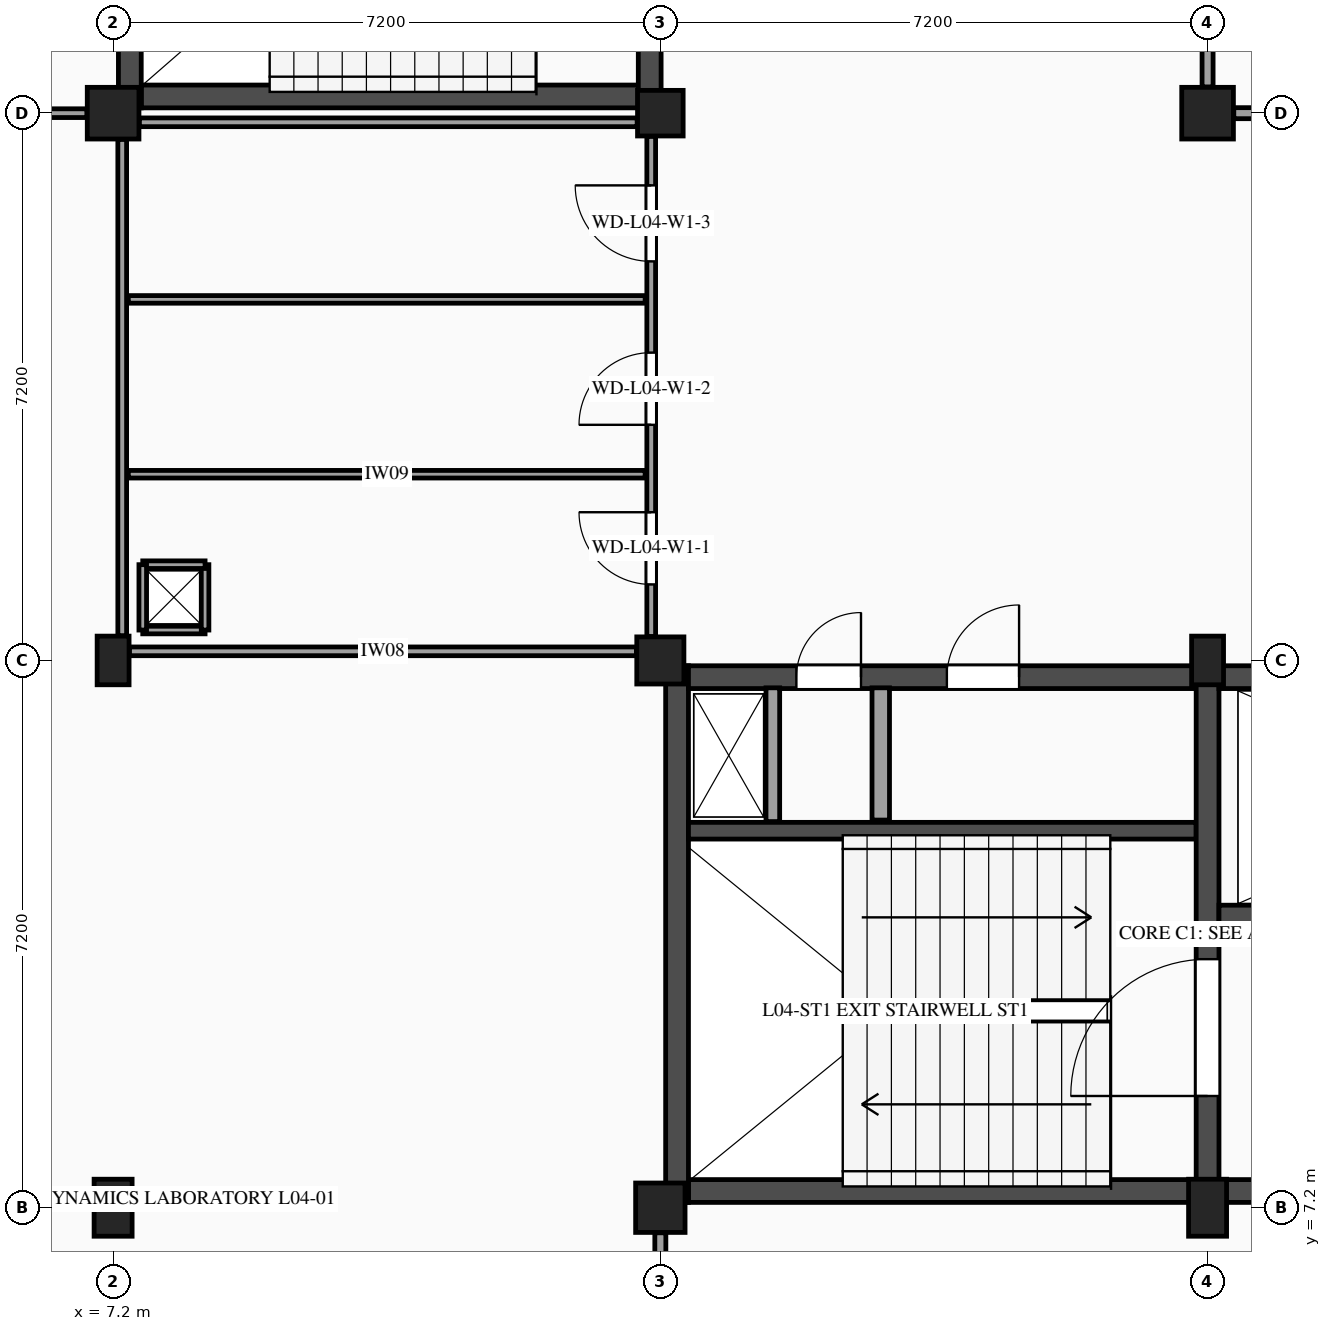
"""IFC4 building model, lengths in metres.
Left out: names, types, materials, properties, quantities, classifications, styles, units other than length and angle.
Written with IfcOpenShell. Run it as: python <this file> out.ifc"""

import sys

from ifc_helpers import new_model, si_unit, direction, frame, frame_2d, origin, origin_2d, place, context, subcontext, project, spatial, rectangle, extrude, element, fill, save


model = new_model("IFC4")
c1 = context("Model", 3, precision=1e-05, world=origin(), true_north=direction((0.0, 1.0)))
c2 = subcontext(c1, "Body", "Model", "MODEL_VIEW")
j1 = project(units=[si_unit("LENGTHUNIT", "METRE"), si_unit("PLANEANGLEUNIT", "RADIAN")], contexts=[c1])
p1 = place(None, origin())
s1 = spatial("IfcSite", under=j1, at=p1, CompositionType="ELEMENT")
p2 = place(p1, origin())
s2 = spatial("IfcBuilding", under=s1, at=p2, CompositionType="ELEMENT")
p3 = place(p2, frame((0.0, 0.0, 18.6)))
s3 = spatial("IfcBuildingStorey", under=s2, at=p3, CompositionType="ELEMENT", Elevation=18.6)
p4 = place(p3, frame((7.2, 7.2, 0.0), z_axis=(0.0, 0.0, 1.0), x_axis=(1.0, 0.0, 0.0)))
e1 = element("IfcColumn", 1, at=p4, inside=s3, PredefinedType="COLUMN", context=c2, shape_type="SweptSolid", body=[
    extrude(rectangle(XDim=0.5, YDim=0.75, at=origin_2d()), origin(), (0.0, 0.0, 1.0), 4.2),
])
p5 = place(p3, frame((7.2, 14.4, 0.0), z_axis=(0.0, 0.0, 1.0), x_axis=(1.0, 0.0, 0.0)))
e2 = element("IfcColumn", 2, at=p5, inside=s3, PredefinedType="PILASTER", context=c2, shape_type="SweptSolid", body=[
    extrude(rectangle(XDim=0.42, YDim=0.64, at=origin_2d()), origin(), (0.0, 0.0, 1.0), 4.2),
])
p6 = place(p3, frame((7.2, 21.6, 0.0), z_axis=(0.0, 0.0, 1.0), x_axis=(1.0, 0.0, 0.0)))
e3 = element("IfcColumn", 3, at=p6, inside=s3, PredefinedType="COLUMN", context=c2, shape_type="SweptSolid", body=[
    extrude(rectangle(XDim=0.68, YDim=0.68, at=origin_2d()), origin(), (0.0, 0.0, 1.0), 4.2),
])
p7 = place(p3, frame((14.4, 7.2, 0.0), z_axis=(0.0, 0.0, 1.0), x_axis=(1.0, 0.0, 0.0)))
e4 = element("IfcColumn", 4, at=p7, inside=s3, PredefinedType="COLUMN", context=c2, shape_type="SweptSolid", body=[
    extrude(rectangle(XDim=0.65, YDim=0.65, at=origin_2d()), origin(), (0.0, 0.0, 1.0), 4.2),
])
p8 = place(p3, frame((14.4, 14.4, 0.0), z_axis=(0.0, 0.0, 1.0), x_axis=(1.0, 0.0, 0.0)))
e5 = element("IfcColumn", 5, at=p8, inside=s3, PredefinedType="COLUMN", context=c2, shape_type="SweptSolid", body=[
    extrude(rectangle(XDim=0.62, YDim=0.62, at=origin_2d()), origin(), (0.0, 0.0, 1.0), 4.2),
])
p9 = place(p3, frame((14.4, 21.6, 0.0), z_axis=(0.0, 0.0, 1.0), x_axis=(1.0, 0.0, 0.0)))
e6 = element("IfcColumn", 6, at=p9, inside=s3, PredefinedType="COLUMN", context=c2, shape_type="SweptSolid", body=[
    extrude(rectangle(XDim=0.6, YDim=0.6, at=origin_2d()), origin(), (0.0, 0.0, 1.0), 4.2),
])
p10 = place(p3, frame((21.6, 7.2, 0.0), z_axis=(0.0, 0.0, 1.0), x_axis=(1.0, 0.0, 0.0)))
e7 = element("IfcColumn", 7, at=p10, inside=s3, PredefinedType="COLUMN", context=c2, shape_type="SweptSolid", body=[
    extrude(rectangle(XDim=0.5, YDim=0.75, at=origin_2d()), origin(), (0.0, 0.0, 1.0), 4.2),
])
p11 = place(p3, frame((21.6, 14.4, 0.0), z_axis=(0.0, 0.0, 1.0), x_axis=(1.0, 0.0, 0.0)))
e8 = element("IfcColumn", 8, at=p11, inside=s3, PredefinedType="PILASTER", context=c2, shape_type="SweptSolid", body=[
    extrude(rectangle(XDim=0.42, YDim=0.64, at=origin_2d()), origin(), (0.0, 0.0, 1.0), 4.2),
])
p12 = place(p3, frame((21.6, 21.6, 0.0), z_axis=(0.0, 0.0, 1.0), x_axis=(1.0, 0.0, 0.0)))
e9 = element("IfcColumn", 9, at=p12, inside=s3, PredefinedType="COLUMN", context=c2, shape_type="SweptSolid", body=[
    extrude(rectangle(XDim=0.68, YDim=0.68, at=origin_2d()), origin(), (0.0, 0.0, 1.0), 4.2),
])
p13 = place(p3, frame((14.77, 7.42, 0.0), z_axis=(0.0, 0.0, 1.0), x_axis=(1.0, 0.0, 0.0)))
e10 = element("IfcWall", 10, at=p13, inside=s3, PredefinedType="SHEAR", context=c2, shape_type="SweptSolid", body=[
    extrude(rectangle(XDim=6.68, YDim=0.3, at=frame_2d((3.34, 0.0))), origin(), (0.0, 0.0, 1.0), 3.955),
])
p14 = place(p3, frame((14.62, 14.33, 0.0), z_axis=(0.0, 0.0, 1.0), x_axis=(0.0, -1.0, 0.0)))
e11 = element("IfcWall", 11, at=p14, inside=s3, PredefinedType="SHEAR", context=c2, shape_type="SweptSolid", body=[
    extrude(rectangle(XDim=7.06, YDim=0.3, at=frame_2d((3.53, 0.0))), origin(), (0.0, 0.0, 1.0), 3.955),
])
p15 = place(p3, frame((14.77, 14.18, 0.0), z_axis=(0.0, 0.0, 1.0), x_axis=(1.0, 0.0, 0.0)))
e12 = element("IfcWall", 12, at=p15, inside=s3, PredefinedType="SHEAR", context=c2, shape_type="SweptSolid", body=[
    extrude(rectangle(XDim=6.68, YDim=0.3, at=frame_2d((3.34, 0.0))), origin(), (0.0, 0.0, 1.0), 3.955),
])
p16 = place(p15, frame((1.42, 0.0, 0.0)))
e13 = element("IfcOpeningElement", 13, at=p16, cuts=e12, PredefinedType="OPENING", context=c2, shape_type="SweptSolid", body=[
    extrude(rectangle(XDim=0.85, YDim=2.1, at=frame_2d((0.425, 1.05))), frame((0.0, 0.16, 0.0), z_axis=(0.0, -1.0, 0.0), x_axis=(1.0, 0.0, 0.0)), (0.0, 0.0, 1.0), 0.32),
])
p17 = place(p15, frame((3.4, 0.0, 0.0)))
e14 = element("IfcOpeningElement", 14, at=p17, cuts=e12, PredefinedType="OPENING", context=c2, shape_type="SweptSolid", body=[
    extrude(rectangle(XDim=0.95, YDim=2.15, at=frame_2d((0.475, 1.075))), frame((0.0, 0.16, 0.0), z_axis=(0.0, -1.0, 0.0), x_axis=(1.0, 0.0, 0.0)), (0.0, 0.0, 1.0), 0.32),
])
p18 = place(p3, frame((14.77, 12.16, 0.0), z_axis=(0.0, 0.0, 1.0), x_axis=(1.0, 0.0, 0.0)))
e15 = element("IfcWall", 15, at=p18, inside=s3, PredefinedType="SHEAR", context=c2, shape_type="SweptSolid", body=[
    extrude(rectangle(XDim=6.68, YDim=0.22, at=frame_2d((3.34, 0.0))), origin(), (0.0, 0.0, 1.0), 3.955),
])
p19 = place(p3, frame((17.3, 12.3, 0.0), z_axis=(0.0, 0.0, 1.0), x_axis=(0.0, 1.0, 0.0)))
e16 = element("IfcWall", 16, at=p19, inside=s3, PredefinedType="PARTITIONING", context=c2, shape_type="SweptSolid", body=[
    extrude(rectangle(XDim=1.74, YDim=0.23, at=frame_2d((0.87, 0.0))), origin(), (0.0, 0.0, 1.0), 3.955),
])
p20 = place(p3, frame((15.88, 12.28, 0.0), z_axis=(0.0, 0.0, 1.0), x_axis=(0.0, 1.0, 0.0)))
e17 = element("IfcWall", 17, at=p20, inside=s3, PredefinedType="PARTITIONING", context=c2, shape_type="SweptSolid", body=[
    extrude(rectangle(XDim=1.76, YDim=0.18, at=frame_2d((0.88, 0.0))), origin(), (0.0, 0.0, 1.0), 3.955),
])
p21 = place(p3, frame((21.6, 7.27, 0.0), z_axis=(0.0, 0.0, 1.0), x_axis=(0.0, 1.0, 0.0)))
e18 = element("IfcWall", 18, at=p21, inside=s3, PredefinedType="SHEAR", context=c2, shape_type="SweptSolid", body=[
    extrude(rectangle(XDim=7.06, YDim=0.3, at=frame_2d((3.53, 0.0))), origin(), (0.0, 0.0, 1.0), 3.955),
])
p22 = place(p21, frame((1.4, 0.0, 0.0)))
e19 = element("IfcOpeningElement", 19, at=p22, cuts=e18, PredefinedType="OPENING", context=c2, shape_type="SweptSolid", body=[
    extrude(rectangle(XDim=1.8, YDim=2.2, at=frame_2d((0.9, 1.1))), frame((0.0, 0.16, 0.0), z_axis=(0.0, -1.0, 0.0), x_axis=(1.0, 0.0, 0.0)), (0.0, 0.0, 1.0), 0.32),
])
p23 = place(p3, frame((21.75, 7.42, 0.0), z_axis=(0.0, 0.0, 1.0), x_axis=(1.0, 0.0, 0.0)))
e20 = element("IfcWall", 20, at=p23, inside=s3, PredefinedType="SHEAR", context=c2, shape_type="SweptSolid", body=[
    extrude(rectangle(XDim=6.68, YDim=0.3, at=frame_2d((3.34, 0.0))), origin(), (0.0, 0.0, 1.0), 3.955),
])
p24 = place(p23, frame((2.22, 0.0, 0.0)))
e21 = element("IfcOpeningElement", 21, at=p24, cuts=e20, PredefinedType="OPENING", context=c2, shape_type="SweptSolid", body=[
    extrude(rectangle(XDim=1.8, YDim=2.2, at=frame_2d((0.9, 1.1))), frame((0.0, 0.16, 0.0), z_axis=(0.0, -1.0, 0.0), x_axis=(1.0, 0.0, 0.0)), (0.0, 0.0, 1.0), 0.32),
])
p25 = place(p3, frame((21.75, 14.18, 0.0), z_axis=(0.0, 0.0, 1.0), x_axis=(1.0, 0.0, 0.0)))
e22 = element("IfcWall", 22, at=p25, inside=s3, PredefinedType="SHEAR", context=c2, shape_type="SweptSolid", body=[
    extrude(rectangle(XDim=6.68, YDim=0.3, at=frame_2d((3.34, 0.0))), origin(), (0.0, 0.0, 1.0), 3.955),
])
p26 = place(p3, frame((21.75, 11.05, 0.0), z_axis=(0.0, 0.0, 1.0), x_axis=(1.0, 0.0, 0.0)))
e23 = element("IfcWall", 23, at=p26, inside=s3, PredefinedType="SHEAR", context=c2, shape_type="SweptSolid", body=[
    extrude(rectangle(XDim=6.68, YDim=0.26, at=frame_2d((3.34, 0.0))), origin(), (0.0, 0.0, 1.0), 3.955),
])
p27 = place(p26, frame((0.95, 0.0, 0.0)))
e24 = element("IfcOpeningElement", 24, at=p27, cuts=e23, PredefinedType="OPENING", context=c2, shape_type="SweptSolid", body=[
    extrude(rectangle(XDim=1.1, YDim=2.2, at=frame_2d((0.55, 1.1))), frame((0.0, 0.14, 0.0), z_axis=(0.0, -1.0, 0.0), x_axis=(1.0, 0.0, 0.0)), (0.0, 0.0, 1.0), 0.28),
])
p28 = place(p26, frame((4.1, 0.0, 0.0)))
e25 = element("IfcOpeningElement", 25, at=p28, cuts=e23, PredefinedType="OPENING", context=c2, shape_type="SweptSolid", body=[
    extrude(rectangle(XDim=1.0, YDim=2.15, at=frame_2d((0.5, 1.075))), frame((0.0, 0.14, 0.0), z_axis=(0.0, -1.0, 0.0), x_axis=(1.0, 0.0, 0.0)), (0.0, 0.0, 1.0), 0.28),
])
p29 = place(p3, frame((7.57, 21.82, 0.0), z_axis=(0.0, 0.0, 1.0), x_axis=(1.0, 0.0, 0.0)))
e26 = element("IfcWall", 26, at=p29, inside=s3, PredefinedType="SHEAR", context=c2, shape_type="SweptSolid", body=[
    extrude(rectangle(XDim=6.54, YDim=0.3, at=frame_2d((3.27, 0.0))), origin(), (0.0, 0.0, 1.0), 3.955),
])
p30 = place(p3, frame((7.42, 28.73, 0.0), z_axis=(0.0, 0.0, 1.0), x_axis=(0.0, -1.0, 0.0)))
e27 = element("IfcWall", 27, at=p30, inside=s3, PredefinedType="SHEAR", context=c2, shape_type="SweptSolid", body=[
    extrude(rectangle(XDim=7.06, YDim=0.3, at=frame_2d((3.53, 0.0))), origin(), (0.0, 0.0, 1.0), 3.955),
])
p31 = place(p3, frame((14.26, 21.67, 0.0), z_axis=(0.0, 0.0, 1.0), x_axis=(0.0, 1.0, 0.0)))
e28 = element("IfcWall", 28, at=p31, inside=s3, PredefinedType="SHEAR", context=c2, shape_type="SweptSolid", body=[
    extrude(rectangle(XDim=7.06, YDim=0.3, at=frame_2d((3.53, 0.0))), origin(), (0.0, 0.0, 1.0), 3.955),
])
p32 = place(p31, frame((5.2, 0.0, 0.0)))
e29 = element("IfcOpeningElement", 29, at=p32, cuts=e28, PredefinedType="OPENING", context=c2, shape_type="SweptSolid", body=[
    extrude(rectangle(XDim=1.35, YDim=2.15, at=frame_2d((0.675, 1.075))), frame((0.0, 0.16, 0.0), z_axis=(0.0, -1.0, 0.0), x_axis=(1.0, 0.0, 0.0)), (0.0, 0.0, 1.0), 0.32),
])
p33 = place(p3, frame((7.415, 14.52, 0.0), z_axis=(0.0, 0.0, 1.0), x_axis=(1.0, 0.0, 0.0)))
e30 = element("IfcWall", 30, at=p33, inside=s3, PredefinedType="PARTITIONING", context=c2, shape_type="SweptSolid", body=[
    extrude(rectangle(XDim=6.67, YDim=0.115, at=frame_2d((3.335, 0.0))), origin(), (0.0, 0.0, 1.0), 3.255),
])
p34 = place(p3, frame((7.545, 21.48, 0.0), z_axis=(0.0, 0.0, 1.0), x_axis=(1.0, 0.0, 0.0)))
e31 = element("IfcWall", 31, at=p34, inside=s3, PredefinedType="PARTITIONING", context=c2, shape_type="SweptSolid", body=[
    extrude(rectangle(XDim=6.55, YDim=0.115, at=frame_2d((3.275, 0.0))), origin(), (0.0, 0.0, 1.0), 3.255),
])
p35 = place(p3, frame((7.32, 14.725, 0.0), z_axis=(0.0, 0.0, 1.0), x_axis=(0.0, 1.0, 0.0)))
e32 = element("IfcWall", 32, at=p35, inside=s3, PredefinedType="PARTITIONING", context=c2, shape_type="SweptSolid", body=[
    extrude(rectangle(XDim=6.53, YDim=0.115, at=frame_2d((3.265, 0.0))), origin(), (0.0, 0.0, 1.0), 3.325),
])
p36 = place(p3, frame((14.28, 14.715, 0.0), z_axis=(0.0, 0.0, 1.0), x_axis=(0.0, 1.0, 0.0)))
e33 = element("IfcWall", 33, at=p36, inside=s3, PredefinedType="PARTITIONING", context=c2, shape_type="SweptSolid", body=[
    extrude(rectangle(XDim=6.58, YDim=0.115, at=frame_2d((3.29, 0.0))), origin(), (0.0, 0.0, 1.0), 3.325),
])
p37 = place(p36, frame((0.685, 0.0, 0.0)))
e34 = element("IfcOpeningElement", 34, at=p37, cuts=e33, PredefinedType="OPENING", context=c2, shape_type="SweptSolid", body=[
    extrude(rectangle(XDim=0.95, YDim=2.1, at=frame_2d((0.475, 1.05))), frame((0.0, 0.067, 0.0), z_axis=(0.0, -1.0, 0.0), x_axis=(1.0, 0.0, 0.0)), (0.0, 0.0, 1.0), 0.135),
])
p38 = place(p36, frame((2.785, 0.0, 0.0)))
e35 = element("IfcOpeningElement", 35, at=p38, cuts=e33, PredefinedType="OPENING", context=c2, shape_type="SweptSolid", body=[
    extrude(rectangle(XDim=0.95, YDim=2.1, at=frame_2d((0.475, 1.05))), frame((0.0, 0.067, 0.0), z_axis=(0.0, -1.0, 0.0), x_axis=(1.0, 0.0, 0.0)), (0.0, 0.0, 1.0), 0.135),
])
p39 = place(p36, frame((4.935, 0.0, 0.0)))
e36 = element("IfcOpeningElement", 36, at=p39, cuts=e33, PredefinedType="OPENING", context=c2, shape_type="SweptSolid", body=[
    extrude(rectangle(XDim=1.0, YDim=2.15, at=frame_2d((0.5, 1.075))), frame((0.0, 0.067, 0.0), z_axis=(0.0, -1.0, 0.0), x_axis=(1.0, 0.0, 0.0)), (0.0, 0.0, 1.0), 0.135),
])
for number, where, z_axis, x_axis in (
    (37, (7.4, 16.85, 0.0), (0.0, 0.0, 1.0), (1.0, 0.0, 0.0)),
    (38, (7.4, 19.15, 0.0), (0.0, 0.0, 1.0), (1.0, 0.0, 0.0)),
):
    element("IfcWall", number, at=place(p3, frame(where, z_axis=z_axis, x_axis=x_axis)), inside=s3, PredefinedType="PARTITIONING", context=c2, shape_type="SweptSolid", body=[
        extrude(rectangle(XDim=6.8, YDim=0.1, at=frame_2d((3.4, 0.0))), origin(), (0.0, 0.0, 1.0), 3.955),
    ])
p40 = place(p3, frame((7.59, 14.8, 0.0), z_axis=(0.0, 0.0, 1.0), x_axis=(1.0, 0.0, 0.0)))
e39 = element("IfcWall", 39, at=p40, inside=s3, PredefinedType="PARTITIONING", context=c2, shape_type="SweptSolid", body=[
    extrude(rectangle(XDim=0.82, YDim=0.1, at=frame_2d((0.41, 0.0))), origin(), (0.0, 0.0, 1.0), 3.955),
])
p41 = place(p3, frame((8.41, 14.8, 0.0), z_axis=(0.0, 0.0, 1.0), x_axis=(0.0, 1.0, 0.0)))
e40 = element("IfcWall", 40, at=p41, inside=s3, PredefinedType="PARTITIONING", context=c2, shape_type="SweptSolid", body=[
    extrude(rectangle(XDim=0.86, YDim=0.1, at=frame_2d((0.43, 0.0))), origin(), (0.0, 0.0, 1.0), 3.955),
])
p42 = place(p3, frame((8.41, 15.66, 0.0), z_axis=(0.0, 0.0, 1.0), x_axis=(-1.0, 0.0, 0.0)))
e41 = element("IfcWall", 41, at=p42, inside=s3, PredefinedType="PARTITIONING", context=c2, shape_type="SweptSolid", body=[
    extrude(rectangle(XDim=0.82, YDim=0.1, at=frame_2d((0.41, 0.0))), origin(), (0.0, 0.0, 1.0), 3.955),
])
p43 = place(p3, frame((7.59, 15.66, 0.0), z_axis=(0.0, 0.0, 1.0), x_axis=(0.0, -1.0, 0.0)))
e42 = element("IfcWall", 42, at=p43, inside=s3, PredefinedType="PARTITIONING", context=c2, shape_type="SweptSolid", body=[
    extrude(rectangle(XDim=0.86, YDim=0.1, at=frame_2d((0.43, 0.0))), origin(), (0.0, 0.0, 1.0), 3.955),
])
p44 = place(p3, frame((0.305, 21.6, 0.0), z_axis=(0.0, 0.0, 1.0), x_axis=(1.0, 0.0, 0.0)))
e43 = element("IfcWall", 43, at=p44, inside=s3, PredefinedType="PARTITIONING", context=c2, shape_type="SweptSolid", body=[
    extrude(rectangle(XDim=6.55, YDim=0.115, at=frame_2d((3.275, 0.0))), origin(), (0.0, 0.0, 1.0), 3.235),
])
p45 = place(p44, frame((2.535, 0.0, 0.0)))
e44 = element("IfcOpeningElement", 44, at=p45, cuts=e43, PredefinedType="OPENING", context=c2, shape_type="SweptSolid", body=[
    extrude(rectangle(XDim=1.48, YDim=2.28, at=frame_2d((0.74, 1.14))), frame((0.0, 0.067, 0.0), z_axis=(0.0, -1.0, 0.0), x_axis=(1.0, 0.0, 0.0)), (0.0, 0.0, 1.0), 0.135),
])
p46 = place(p3, frame((14.4, 0.345, 0.0), z_axis=(0.0, 0.0, 1.0), x_axis=(0.0, 1.0, 0.0)))
e45 = element("IfcWall", 45, at=p46, inside=s3, PredefinedType="PARTITIONING", context=c2, shape_type="SweptSolid", body=[
    extrude(rectangle(XDim=6.525, YDim=0.145, at=frame_2d((3.263, 0.0))), origin(), (0.0, 0.0, 1.0), 3.26),
])
p47 = place(p46, frame((2.673, 0.0, 0.0)))
e46 = element("IfcOpeningElement", 46, at=p47, cuts=e45, PredefinedType="OPENING", context=c2, shape_type="SweptSolid", body=[
    extrude(rectangle(XDim=1.18, YDim=2.18, at=frame_2d((0.59, 1.09))), frame((0.0, 0.083, 0.0), z_axis=(0.0, -1.0, 0.0), x_axis=(1.0, 0.0, 0.0)), (0.0, 0.0, 1.0), 0.165),
])
p48 = place(p3, frame((21.6, 21.945, 0.0), z_axis=(0.0, 0.0, 1.0), x_axis=(0.0, 1.0, 0.0)))
e47 = element("IfcWall", 47, at=p48, inside=s3, PredefinedType="PARTITIONING", context=c2, shape_type="SweptSolid", body=[
    extrude(rectangle(XDim=6.525, YDim=0.145, at=frame_2d((3.262, 0.0))), origin(), (0.0, 0.0, 1.0), 3.3),
])
p49 = place(p48, frame((2.482, 0.0, 0.0)))
e48 = element("IfcOpeningElement", 48, at=p49, cuts=e47, PredefinedType="OPENING", context=c2, shape_type="SweptSolid", body=[
    extrude(rectangle(XDim=1.56, YDim=2.25, at=frame_2d((0.78, 1.125))), frame((0.0, 0.083, 0.0), z_axis=(0.0, -1.0, 0.0), x_axis=(1.0, 0.0, 0.0)), (0.0, 0.0, 1.0), 0.165),
])
p50 = place(p3, frame((21.945, 21.6, 0.0), z_axis=(0.0, 0.0, 1.0), x_axis=(1.0, 0.0, 0.0)))
e49 = element("IfcWall", 49, at=p50, inside=s3, PredefinedType="PARTITIONING", context=c2, shape_type="SweptSolid", body=[
    extrude(rectangle(XDim=6.55, YDim=0.145, at=frame_2d((3.275, 0.0))), origin(), (0.0, 0.0, 1.0), 3.285),
])
p51 = place(p16, origin())
e50 = element("IfcDoor", 50, at=p51, inside=s3, OperationType="SINGLE_SWING_RIGHT", PredefinedType="DOOR", context=c2, shape_type="SweptSolid", body=[
    extrude(rectangle(XDim=0.85, YDim=2.1, at=frame_2d((0.425, 1.05))), frame((0.0, 0.025, 0.0), z_axis=(0.0, -1.0, 0.0), x_axis=(1.0, 0.0, 0.0)), (0.0, 0.0, 1.0), 0.05),
])
fill(e13, e50)
p52 = place(p22, origin())
e51 = element("IfcDoor", 51, at=p52, inside=s3, OperationType="SINGLE_SWING_LEFT", PredefinedType="DOOR", context=c2, shape_type="SweptSolid", body=[
    extrude(rectangle(XDim=1.8, YDim=2.2, at=frame_2d((0.9, 1.1))), frame((0.0, 0.025, 0.0), z_axis=(0.0, -1.0, 0.0), x_axis=(1.0, 0.0, 0.0)), (0.0, 0.0, 1.0), 0.05),
])
fill(e19, e51)
p53 = place(p17, origin())
e52 = element("IfcDoor", 52, at=p53, inside=s3, OperationType="SINGLE_SWING_RIGHT", PredefinedType="DOOR", context=c2, shape_type="SweptSolid", body=[
    extrude(rectangle(XDim=0.95, YDim=2.15, at=frame_2d((0.475, 1.075))), frame((0.0, 0.025, 0.0), z_axis=(0.0, -1.0, 0.0), x_axis=(1.0, 0.0, 0.0)), (0.0, 0.0, 1.0), 0.05),
])
fill(e14, e52)
p54 = place(p37, origin())
e53 = element("IfcDoor", 53, at=p54, inside=s3, OperationType="SINGLE_SWING_RIGHT", PredefinedType="DOOR", context=c2, shape_type="SweptSolid", body=[
    extrude(rectangle(XDim=0.95, YDim=2.1, at=frame_2d((0.475, 1.05))), frame((0.0, 0.025, 0.0), z_axis=(0.0, -1.0, 0.0), x_axis=(1.0, 0.0, 0.0)), (0.0, 0.0, 1.0), 0.05),
])
fill(e34, e53)
p55 = place(p38, origin())
e54 = element("IfcDoor", 54, at=p55, inside=s3, OperationType="SINGLE_SWING_LEFT", PredefinedType="DOOR", context=c2, shape_type="SweptSolid", body=[
    extrude(rectangle(XDim=0.95, YDim=2.1, at=frame_2d((0.475, 1.05))), frame((0.0, 0.025, 0.0), z_axis=(0.0, -1.0, 0.0), x_axis=(1.0, 0.0, 0.0)), (0.0, 0.0, 1.0), 0.05),
])
fill(e35, e54)
p56 = place(p39, origin())
e55 = element("IfcDoor", 55, at=p56, inside=s3, OperationType="SINGLE_SWING_RIGHT", PredefinedType="DOOR", context=c2, shape_type="SweptSolid", body=[
    extrude(rectangle(XDim=1.0, YDim=2.15, at=frame_2d((0.5, 1.075))), frame((0.0, 0.025, 0.0), z_axis=(0.0, -1.0, 0.0), x_axis=(1.0, 0.0, 0.0)), (0.0, 0.0, 1.0), 0.05),
])
fill(e36, e55)
save(model, sys.argv[1])
